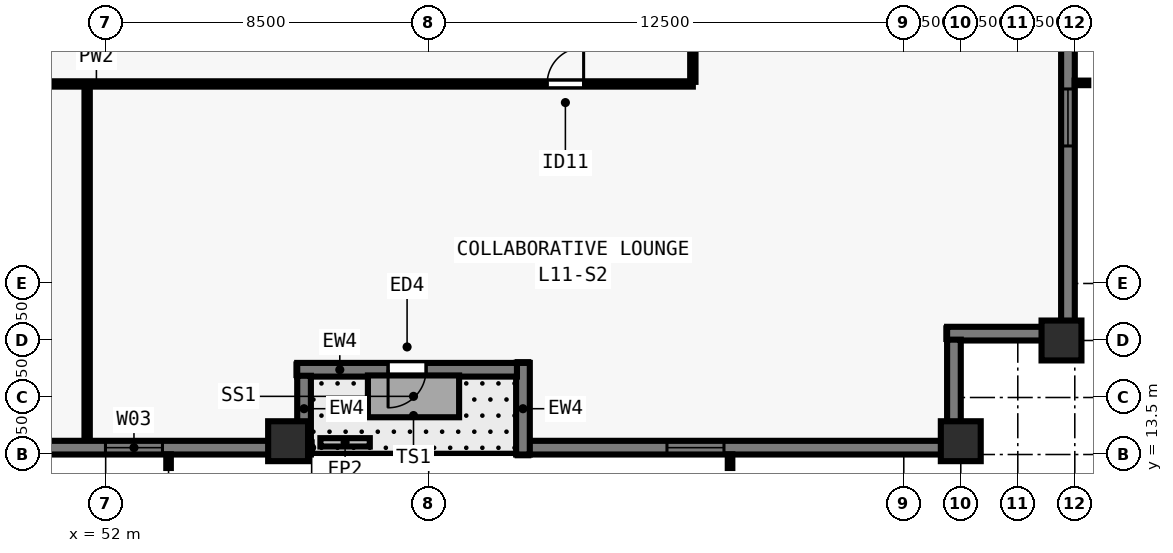
"""IFC4 building model, lengths in metres.
Left out: names, types, materials, properties, quantities, classifications, styles, units other than length and angle.
Written with IfcOpenShell. Run it as: python <this file> out.ifc"""

import sys

from ifc_helpers import new_model, si_unit, direction, frame, frame_2d, origin, origin_2d, place, context, subcontext, project, spatial, rectangle, extrude, element, fill, save


model = new_model("IFC4")
c1 = context("Model", 3, precision=1e-05, world=origin(), true_north=direction((0.0, 1.0)))
c2 = subcontext(c1, "Body", "Model", "MODEL_VIEW")
j1 = project(units=[si_unit("LENGTHUNIT", "METRE"), si_unit("PLANEANGLEUNIT", "RADIAN")], contexts=[c1])
p1 = place(None, origin())
s1 = spatial("IfcSite", under=j1, at=p1, CompositionType="ELEMENT")
p2 = place(p1, origin())
s2 = spatial("IfcBuilding", under=s1, at=p2, CompositionType="ELEMENT")
p3 = place(p2, frame((0.0, 0.0, 44.5)))
s3 = spatial("IfcBuildingStorey", under=s2, at=p3, CompositionType="ELEMENT", Elevation=44.5)
for number, where, z_axis, x_axis in (
    (1, (56.8, 13.85, 0.0), (0.0, 0.0, 1.0), (1.0, 0.0, 0.0)),
    (2, (74.5, 13.85, 0.0), (0.0, 0.0, 1.0), (1.0, 0.0, 0.0)),
    (3, (77.15, 16.5, 0.0), (0.0, 0.0, 1.0), (0.0, 1.0, 0.0)),
):
    element("IfcColumn", number, at=place(p3, frame(where, z_axis=z_axis, x_axis=x_axis)), inside=s3, PredefinedType="COLUMN", context=c2, shape_type="SweptSolid", body=[
        extrude(rectangle(XDim=1.05, YDim=1.05, at=origin_2d()), origin(), (0.0, 0.0, 1.0), 3.5),
    ])
p4 = place(p3, frame((57.4, 13.68, 0.0), z_axis=(0.0, 0.0, 1.0), x_axis=(-1.0, 0.0, 0.0)))
e4 = element("IfcWall", 4, at=p4, inside=s3, PredefinedType="SOLIDWALL", context=c2, shape_type="SweptSolid", body=[
    extrude(rectangle(XDim=27.562, YDim=0.36, at=frame_2d((13.781, 0.0))), origin(), (0.0, 0.0, 1.0), 3.28),
])
p5 = place(p4, frame((3.905, 0.0, 0.8)))
e5 = element("IfcOpeningElement", 5, at=p5, cuts=e4, PredefinedType="OPENING", context=c2, shape_type="SweptSolid", body=[
    extrude(rectangle(XDim=1.5, YDim=1.544, at=frame_2d((0.75, 0.772))), frame((0.0, 0.19, 0.0), z_axis=(0.0, -1.0, 0.0), x_axis=(1.0, 0.0, 0.0)), (0.0, 0.0, 1.0), 0.38),
])
p6 = place(p4, frame((8.216, 0.0, 0.8)))
e6 = element("IfcOpeningElement", 6, at=p6, cuts=e4, PredefinedType="OPENING", context=c2, shape_type="SweptSolid", body=[
    extrude(rectangle(XDim=1.2, YDim=1.544, at=frame_2d((0.6, 0.772))), frame((0.0, 0.19, 0.0), z_axis=(0.0, -1.0, 0.0), x_axis=(1.0, 0.0, 0.0)), (0.0, 0.0, 1.0), 0.38),
])
p7 = place(p4, frame((11.376, 0.0, 0.8)))
e7 = element("IfcOpeningElement", 7, at=p7, cuts=e4, PredefinedType="OPENING", context=c2, shape_type="SweptSolid", body=[
    extrude(rectangle(XDim=1.5, YDim=1.544, at=frame_2d((0.75, 0.772))), frame((0.0, 0.19, 0.0), z_axis=(0.0, -1.0, 0.0), x_axis=(1.0, 0.0, 0.0)), (0.0, 0.0, 1.0), 0.38),
])
p8 = place(p4, frame((14.836, 0.0, 0.8)))
e8 = element("IfcOpeningElement", 8, at=p8, cuts=e4, PredefinedType="OPENING", context=c2, shape_type="SweptSolid", body=[
    extrude(rectangle(XDim=1.2, YDim=1.544, at=frame_2d((0.6, 0.772))), frame((0.0, 0.19, 0.0), z_axis=(0.0, -1.0, 0.0), x_axis=(1.0, 0.0, 0.0)), (0.0, 0.0, 1.0), 0.38),
])
p9 = place(p4, frame((17.997, 0.0, 0.8)))
e9 = element("IfcOpeningElement", 9, at=p9, cuts=e4, PredefinedType="OPENING", context=c2, shape_type="SweptSolid", body=[
    extrude(rectangle(XDim=1.5, YDim=1.544, at=frame_2d((0.75, 0.772))), frame((0.0, 0.19, 0.0), z_axis=(0.0, -1.0, 0.0), x_axis=(1.0, 0.0, 0.0)), (0.0, 0.0, 1.0), 0.38),
])
p10 = place(p4, frame((21.457, 0.0, 0.8)))
e10 = element("IfcOpeningElement", 10, at=p10, cuts=e4, PredefinedType="OPENING", context=c2, shape_type="SweptSolid", body=[
    extrude(rectangle(XDim=1.2, YDim=1.544, at=frame_2d((0.6, 0.772))), frame((0.0, 0.19, 0.0), z_axis=(0.0, -1.0, 0.0), x_axis=(1.0, 0.0, 0.0)), (0.0, 0.0, 1.0), 0.38),
])
p11 = place(p3, frame((77.32, 61.5, 0.0), z_axis=(0.0, 0.0, 1.0), x_axis=(0.0, -1.0, 0.0)))
e11 = element("IfcWall", 11, at=p11, inside=s3, PredefinedType="SOLIDWALL", context=c2, shape_type="SweptSolid", body=[
    extrude(rectangle(XDim=44.662, YDim=0.36, at=frame_2d((22.331, 0.0))), origin(), (0.0, 0.0, 1.0), 3.28),
])
p12 = place(p11, frame((4.78, 0.0, 0.8)))
e12 = element("IfcOpeningElement", 12, at=p12, cuts=e11, PredefinedType="OPENING", context=c2, shape_type="SweptSolid", body=[
    extrude(rectangle(XDim=1.5, YDim=1.544, at=frame_2d((0.75, 0.772))), frame((0.0, 0.19, 0.0), z_axis=(0.0, -1.0, 0.0), x_axis=(1.0, 0.0, 0.0)), (0.0, 0.0, 1.0), 0.38),
])
p13 = place(p11, frame((8.29, 0.0, 0.8)))
e13 = element("IfcOpeningElement", 13, at=p13, cuts=e11, PredefinedType="OPENING", context=c2, shape_type="SweptSolid", body=[
    extrude(rectangle(XDim=1.2, YDim=1.544, at=frame_2d((0.6, 0.772))), frame((0.0, 0.19, 0.0), z_axis=(0.0, -1.0, 0.0), x_axis=(1.0, 0.0, 0.0)), (0.0, 0.0, 1.0), 0.38),
])
p14 = place(p11, frame((11.5, 0.0, 0.8)))
e14 = element("IfcOpeningElement", 14, at=p14, cuts=e11, PredefinedType="OPENING", context=c2, shape_type="SweptSolid", body=[
    extrude(rectangle(XDim=1.5, YDim=1.544, at=frame_2d((0.75, 0.772))), frame((0.0, 0.19, 0.0), z_axis=(0.0, -1.0, 0.0), x_axis=(1.0, 0.0, 0.0)), (0.0, 0.0, 1.0), 0.38),
])
p15 = place(p11, frame((15.01, 0.0, 0.8)))
e15 = element("IfcOpeningElement", 15, at=p15, cuts=e11, PredefinedType="OPENING", context=c2, shape_type="SweptSolid", body=[
    extrude(rectangle(XDim=1.2, YDim=1.544, at=frame_2d((0.6, 0.772))), frame((0.0, 0.19, 0.0), z_axis=(0.0, -1.0, 0.0), x_axis=(1.0, 0.0, 0.0)), (0.0, 0.0, 1.0), 0.38),
])
p16 = place(p11, frame((18.671, 0.0, 0.8)))
e16 = element("IfcOpeningElement", 16, at=p16, cuts=e11, PredefinedType="OPENING", context=c2, shape_type="SweptSolid", body=[
    extrude(rectangle(XDim=1.5, YDim=1.544, at=frame_2d((0.75, 0.772))), frame((0.0, 0.19, 0.0), z_axis=(0.0, -1.0, 0.0), x_axis=(1.0, 0.0, 0.0)), (0.0, 0.0, 1.0), 0.38),
])
p17 = place(p11, frame((22.581, 0.0, 0.8)))
e17 = element("IfcOpeningElement", 17, at=p17, cuts=e11, PredefinedType="OPENING", context=c2, shape_type="SweptSolid", body=[
    extrude(rectangle(XDim=1.2, YDim=1.544, at=frame_2d((0.6, 0.772))), frame((0.0, 0.19, 0.0), z_axis=(0.0, -1.0, 0.0), x_axis=(1.0, 0.0, 0.0)), (0.0, 0.0, 1.0), 0.38),
])
p18 = place(p11, frame((24.941, 0.0, 0.8)))
e18 = element("IfcOpeningElement", 18, at=p18, cuts=e11, PredefinedType="OPENING", context=c2, shape_type="SweptSolid", body=[
    extrude(rectangle(XDim=1.5, YDim=1.544, at=frame_2d((0.75, 0.772))), frame((0.0, 0.19, 0.0), z_axis=(0.0, -1.0, 0.0), x_axis=(1.0, 0.0, 0.0)), (0.0, 0.0, 1.0), 0.38),
])
p19 = place(p11, frame((28.451, 0.0, 0.8)))
e19 = element("IfcOpeningElement", 19, at=p19, cuts=e11, PredefinedType="OPENING", context=c2, shape_type="SweptSolid", body=[
    extrude(rectangle(XDim=1.2, YDim=1.544, at=frame_2d((0.6, 0.772))), frame((0.0, 0.19, 0.0), z_axis=(0.0, -1.0, 0.0), x_axis=(1.0, 0.0, 0.0)), (0.0, 0.0, 1.0), 0.38),
])
p20 = place(p11, frame((31.662, 0.0, 0.8)))
e20 = element("IfcOpeningElement", 20, at=p20, cuts=e11, PredefinedType="OPENING", context=c2, shape_type="SweptSolid", body=[
    extrude(rectangle(XDim=1.5, YDim=1.544, at=frame_2d((0.75, 0.772))), frame((0.0, 0.19, 0.0), z_axis=(0.0, -1.0, 0.0), x_axis=(1.0, 0.0, 0.0)), (0.0, 0.0, 1.0), 0.38),
])
p21 = place(p11, frame((35.172, 0.0, 0.8)))
e21 = element("IfcOpeningElement", 21, at=p21, cuts=e11, PredefinedType="OPENING", context=c2, shape_type="SweptSolid", body=[
    extrude(rectangle(XDim=1.2, YDim=1.544, at=frame_2d((0.6, 0.772))), frame((0.0, 0.19, 0.0), z_axis=(0.0, -1.0, 0.0), x_axis=(1.0, 0.0, 0.0)), (0.0, 0.0, 1.0), 0.38),
])
p22 = place(p11, frame((38.382, 0.0, 0.8)))
e22 = element("IfcOpeningElement", 22, at=p22, cuts=e11, PredefinedType="OPENING", context=c2, shape_type="SweptSolid", body=[
    extrude(rectangle(XDim=1.5, YDim=1.544, at=frame_2d((0.75, 0.772))), frame((0.0, 0.19, 0.0), z_axis=(0.0, -1.0, 0.0), x_axis=(1.0, 0.0, 0.0)), (0.0, 0.0, 1.0), 0.38),
])
p23 = place(p3, frame((77.5, 16.68, 0.0), z_axis=(0.0, 0.0, 1.0), x_axis=(-1.0, 0.0, 0.0)))
e23 = element("IfcWall", 23, at=p23, inside=s3, PredefinedType="SOLIDWALL", context=c2, shape_type="SweptSolid", body=[
    extrude(rectangle(XDim=3.36, YDim=0.36, at=frame_2d((1.68, 0.0))), origin(), (0.0, 0.0, 1.0), 3.28),
])
p24 = place(p3, frame((74.32, 16.522, 0.0), z_axis=(0.0, 0.0, 1.0), x_axis=(0.0, -1.0, 0.0)))
e24 = element("IfcWall", 24, at=p24, inside=s3, PredefinedType="SOLIDWALL", context=c2, shape_type="SweptSolid", body=[
    extrude(rectangle(XDim=2.684, YDim=0.36, at=frame_2d((1.342, 0.0))), origin(), (0.0, 0.0, 1.0), 3.28),
])
p25 = place(p3, frame((74.5, 13.68, 0.0), z_axis=(0.0, 0.0, 1.0), x_axis=(-1.0, 0.0, 0.0)))
e25 = element("IfcWall", 25, at=p25, inside=s3, PredefinedType="SOLIDWALL", context=c2, shape_type="SweptSolid", body=[
    extrude(rectangle(XDim=11.362, YDim=0.36, at=frame_2d((5.681, 0.0))), origin(), (0.0, 0.0, 1.0), 3.28),
])
p26 = place(p25, frame((6.231, 0.0, 0.8)))
e26 = element("IfcOpeningElement", 26, at=p26, cuts=e25, PredefinedType="OPENING", context=c2, shape_type="SweptSolid", body=[
    extrude(rectangle(XDim=1.5, YDim=1.544, at=frame_2d((0.75, 0.772))), frame((0.0, 0.19, 0.0), z_axis=(0.0, -1.0, 0.0), x_axis=(1.0, 0.0, 0.0)), (0.0, 0.0, 1.0), 0.38),
])
p27 = place(p3, frame((62.98, 13.5, 0.0), z_axis=(0.0, 0.0, 1.0), x_axis=(0.0, 1.0, 0.0)))
e27 = element("IfcWall", 27, at=p27, inside=s3, PredefinedType="SOLIDWALL", context=c2, shape_type="SweptSolid", body=[
    extrude(rectangle(XDim=2.41, YDim=0.36, at=frame_2d((1.205, 0.0))), origin(), (0.0, 0.0, 1.0), 3.28),
])
p28 = place(p3, frame((62.822, 15.73, 0.0), z_axis=(0.0, 0.0, 1.0), x_axis=(-1.0, 0.0, 0.0)))
e28 = element("IfcWall", 28, at=p28, inside=s3, PredefinedType="SOLIDWALL", context=c2, shape_type="SweptSolid", body=[
    extrude(rectangle(XDim=5.782, YDim=0.36, at=frame_2d((2.891, 0.0))), origin(), (0.0, 0.0, 1.0), 3.28),
])
p29 = place(p28, frame((2.391, 0.0, 0.0)))
e29 = element("IfcOpeningElement", 29, at=p29, cuts=e28, PredefinedType="OPENING", context=c2, shape_type="SweptSolid", body=[
    extrude(rectangle(XDim=1.0, YDim=2.15, at=frame_2d((0.5, 1.075))), frame((0.0, 0.19, 0.0), z_axis=(0.0, -1.0, 0.0), x_axis=(1.0, 0.0, 0.0)), (0.0, 0.0, 1.0), 0.38),
])
p30 = place(p3, frame((57.22, 15.572, 0.0), z_axis=(0.0, 0.0, 1.0), x_axis=(0.0, -1.0, 0.0)))
e30 = element("IfcWall", 30, at=p30, inside=s3, PredefinedType="SOLIDWALL", context=c2, shape_type="SweptSolid", body=[
    extrude(rectangle(XDim=1.734, YDim=0.36, at=frame_2d((0.867, 0.0))), origin(), (0.0, 0.0, 1.0), 3.28),
])
p31 = place(p3, frame((57.65, 13.82, 0.0), z_axis=(0.0, 0.0, 1.0), x_axis=(1.0, 0.0, 0.0)))
e31 = element("IfcWall", 31, at=p31, inside=s3, PredefinedType="PARAPET", context=c2, shape_type="SweptSolid", body=[
    extrude(rectangle(XDim=1.3, YDim=0.22, at=frame_2d((0.65, 0.0))), origin(), (0.0, 0.0, 1.0), 0.55),
])
p32 = place(p3, frame((36.55, 23.25, 0.0), z_axis=(0.0, 0.0, 1.0), x_axis=(1.0, 0.0, 0.0)))
e32 = element("IfcWall", 32, at=p32, inside=s3, PredefinedType="PARTITIONING", context=c2, shape_type="SweptSolid", body=[
    extrude(rectangle(XDim=30.9, YDim=0.14, at=frame_2d((15.45, 0.0))), origin(), (0.0, 0.0, 1.0), 3.28),
])
p33 = place(p32, frame((2.386, 0.0, 0.0)))
e33 = element("IfcOpeningElement", 33, at=p33, cuts=e32, PredefinedType="OPENING", context=c2, shape_type="SweptSolid", body=[
    extrude(rectangle(XDim=0.96, YDim=2.12, at=frame_2d((0.48, 1.06))), frame((0.0, 0.08, 0.0), z_axis=(0.0, -1.0, 0.0), x_axis=(1.0, 0.0, 0.0)), (0.0, 0.0, 1.0), 0.16),
])
p34 = place(p32, frame((27.066, 0.0, 0.0)))
e34 = element("IfcOpeningElement", 34, at=p34, cuts=e32, PredefinedType="OPENING", context=c2, shape_type="SweptSolid", body=[
    extrude(rectangle(XDim=0.96, YDim=2.12, at=frame_2d((0.48, 1.06))), frame((0.0, 0.08, 0.0), z_axis=(0.0, -1.0, 0.0), x_axis=(1.0, 0.0, 0.0)), (0.0, 0.0, 1.0), 0.16),
])
p35 = place(p3, frame((67.45, 23.305, 0.0), z_axis=(0.0, 0.0, 1.0), x_axis=(0.0, 1.0, 0.0)))
e35 = element("IfcWall", 35, at=p35, inside=s3, PredefinedType="PARTITIONING", context=c2, shape_type="SweptSolid", body=[
    extrude(rectangle(XDim=31.39, YDim=0.14, at=frame_2d((15.695, 0.0))), origin(), (0.0, 0.0, 1.0), 3.28),
])
p36 = place(p35, frame((7.561, 0.0, 0.0)))
e36 = element("IfcOpeningElement", 36, at=p36, cuts=e35, PredefinedType="OPENING", context=c2, shape_type="SweptSolid", body=[
    extrude(rectangle(XDim=0.96, YDim=2.12, at=frame_2d((0.48, 1.06))), frame((0.0, 0.08, 0.0), z_axis=(0.0, -1.0, 0.0), x_axis=(1.0, 0.0, 0.0)), (0.0, 0.0, 1.0), 0.16),
])
p37 = place(p35, frame((23.211, 0.0, 0.0)))
e37 = element("IfcOpeningElement", 37, at=p37, cuts=e35, PredefinedType="OPENING", context=c2, shape_type="SweptSolid", body=[
    extrude(rectangle(XDim=0.96, YDim=2.12, at=frame_2d((0.48, 1.06))), frame((0.0, 0.08, 0.0), z_axis=(0.0, -1.0, 0.0), x_axis=(1.0, 0.0, 0.0)), (0.0, 0.0, 1.0), 0.16),
])
p38 = place(p3, frame((51.512, 13.92, 0.0), z_axis=(0.0, 0.0, 1.0), x_axis=(0.0, 1.0, 0.0)))
e38 = element("IfcWall", 38, at=p38, inside=s3, PredefinedType="PARTITIONING", context=c2, shape_type="SweptSolid", body=[
    extrude(rectangle(XDim=9.23, YDim=0.14, at=frame_2d((4.615, 0.0))), origin(), (0.0, 0.0, 1.0), 2.849),
])
p39 = place(p5, origin())
e39 = element("IfcWindow", 39, at=p39, inside=s3, PartitioningType="SINGLE_PANEL", PredefinedType="WINDOW", context=c2, shape_type="SweptSolid", body=[
    extrude(rectangle(XDim=1.5, YDim=1.544, at=frame_2d((0.75, 0.772))), frame((0.0, -0.05, 0.0), z_axis=(0.0, -1.0, 0.0), x_axis=(1.0, 0.0, 0.0)), (0.0, 0.0, 1.0), 0.06),
])
fill(e5, e39)
p40 = place(p22, origin())
e40 = element("IfcWindow", 40, at=p40, inside=s3, PartitioningType="SINGLE_PANEL", PredefinedType="WINDOW", context=c2, shape_type="SweptSolid", body=[
    extrude(rectangle(XDim=1.5, YDim=1.544, at=frame_2d((0.75, 0.772))), frame((0.0, -0.05, 0.0), z_axis=(0.0, -1.0, 0.0), x_axis=(1.0, 0.0, 0.0)), (0.0, 0.0, 1.0), 0.06),
])
fill(e22, e40)
p41 = place(p26, origin())
e41 = element("IfcWindow", 41, at=p41, inside=s3, PartitioningType="SINGLE_PANEL", PredefinedType="WINDOW", context=c2, shape_type="SweptSolid", body=[
    extrude(rectangle(XDim=1.5, YDim=1.544, at=frame_2d((0.75, 0.772))), frame((0.0, -0.05, 0.0), z_axis=(0.0, -1.0, 0.0), x_axis=(1.0, 0.0, 0.0)), (0.0, 0.0, 1.0), 0.06),
])
fill(e26, e41)
p42 = place(p29, origin())
e42 = element("IfcDoor", 42, at=p42, inside=s3, OperationType="SINGLE_SWING_RIGHT", PredefinedType="DOOR", context=c2, shape_type="SweptSolid", body=[
    extrude(rectangle(XDim=1.0, YDim=2.15, at=frame_2d((0.5, 1.075))), frame((0.0, 0.025, 0.0), z_axis=(0.0, -1.0, 0.0), x_axis=(1.0, 0.0, 0.0)), (0.0, 0.0, 1.0), 0.05),
])
fill(e29, e42)
p43 = place(p34, origin())
e43 = element("IfcDoor", 43, at=p43, inside=s3, OperationType="SINGLE_SWING_RIGHT", PredefinedType="DOOR", context=c2, shape_type="SweptSolid", body=[
    extrude(rectangle(XDim=0.96, YDim=2.12, at=frame_2d((0.48, 1.06))), frame((0.0, 0.025, 0.0), z_axis=(0.0, -1.0, 0.0), x_axis=(1.0, 0.0, 0.0)), (0.0, 0.0, 1.0), 0.05),
])
fill(e34, e43)
save(model, sys.argv[1])
